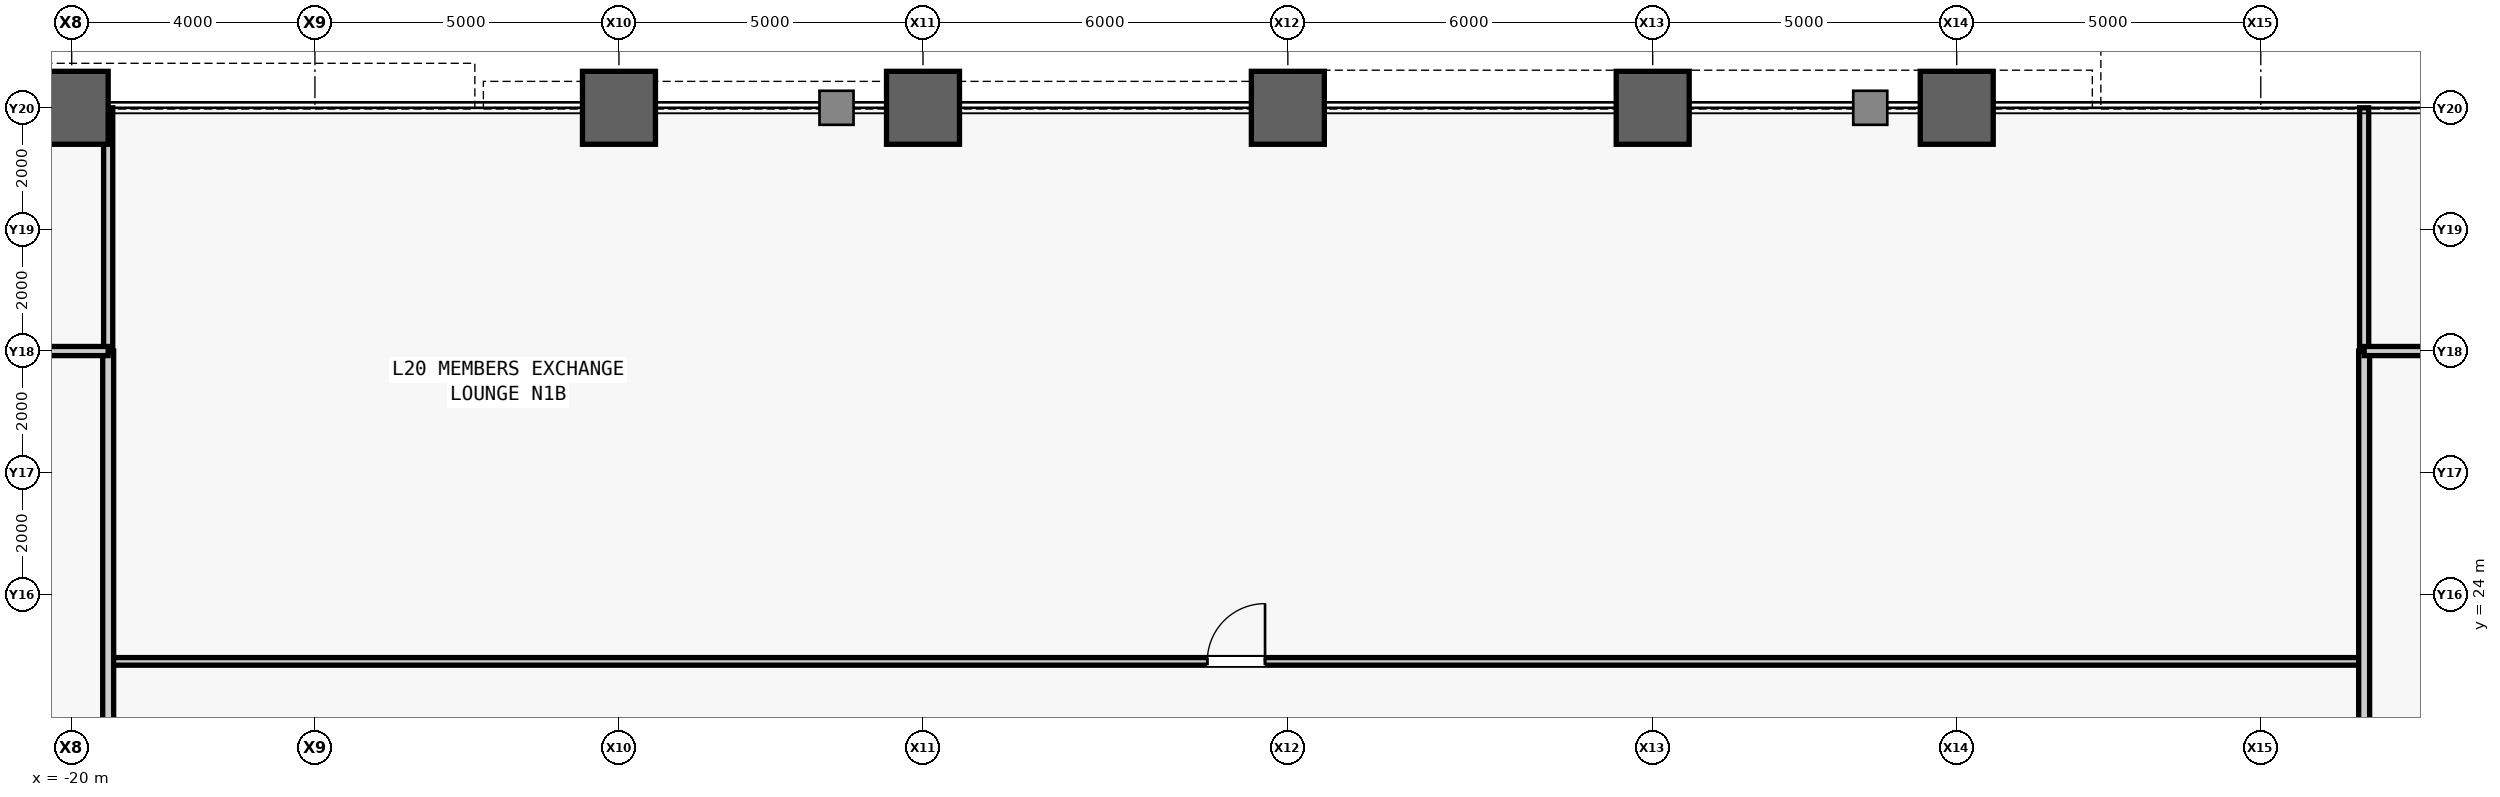
"""IFC4 building model, lengths in metres.
Left out: names, types, materials, properties, quantities, classifications, styles, units other than length and angle.
Written with IfcOpenShell. Run it as: python <this file> out.ifc"""

import sys

from ifc_helpers import new_model, si_unit, direction, frame, frame_2d, origin, origin_2d, place, context, subcontext, project, spatial, rectangle, hollow_rectangle, extrude, source, transform, mapped, element, fill, save


model = new_model("IFC4")
c1 = context("Model", 3, precision=1e-05, world=origin(), true_north=direction((0.0, 1.0)))
c2 = subcontext(c1, "Body", "Model", "MODEL_VIEW")
j1 = project(units=[si_unit("LENGTHUNIT", "METRE"), si_unit("PLANEANGLEUNIT", "RADIAN")], contexts=[c1])
p1 = place(None, origin())
s1 = spatial("IfcSite", under=j1, at=p1, CompositionType="ELEMENT")
p2 = place(p1, origin())
s2 = spatial("IfcBuilding", under=s1, at=p2, CompositionType="ELEMENT")
p3 = place(p2, frame((0.0, 0.0, 91.4)))
s3 = spatial("IfcBuildingStorey", under=s2, at=p3, CompositionType="ELEMENT", Elevation=91.4)
m1 = source(origin(), c2, "Body", "SweptSolid", [
    extrude(hollow_rectangle(XDim=1.2, YDim=1.2, WallThickness=0.07, at=origin_2d()), origin(), (0.0, 0.0, 1.0), 4.1),
])
for number, where, z_axis, x_axis in (
    (1, (-20.0, 32.0, 0.0), (0.0, 0.0, 1.0), (1.0, 0.0, 0.0)),
    (2, (-11.0, 32.0, 0.0), (0.0, 0.0, 1.0), (1.0, 0.0, 0.0)),
    (3, (-6.0, 32.0, 0.0), (0.0, 0.0, 1.0), (1.0, 0.0, 0.0)),
    (4, (0.0, 32.0, 0.0), (0.0, 0.0, 1.0), (1.0, 0.0, 0.0)),
    (5, (6.0, 32.0, 0.0), (0.0, 0.0, 1.0), (1.0, 0.0, 0.0)),
    (6, (11.0, 32.0, 0.0), (0.0, 0.0, 1.0), (1.0, 0.0, 0.0)),
):
    element("IfcColumn", number, at=place(p3, frame(where, z_axis=z_axis, x_axis=x_axis)), inside=s3, PredefinedType="COLUMN", context=c2, shape_type="MappedRepresentation", body=[
        mapped(m1, transform((0.0, 0.0, 0.0), scale=1.0)),
    ])
m2 = source(origin(), c2, "Body", "SweptSolid", [
    extrude(rectangle(XDim=37.1, YDim=0.125, at=frame_2d((18.55, 0.0))), origin(), (0.0, 0.0, 1.0), 3.84),
])
p4 = place(p3, frame((-19.4, 22.896, 0.0), z_axis=(0.0, 0.0, 1.0), x_axis=(1.0, 0.0, 0.0)))
e7 = element("IfcWall", 7, at=p4, inside=s3, PredefinedType="PARTITIONING", context=c2, shape_type="MappedRepresentation", body=[
    mapped(m2, transform((0.0, 0.0, 0.0), scale=1.0)),
])
m3 = source(origin(), c2, "Body", "SweptSolid", [
    extrude(rectangle(XDim=0.95, YDim=2.15, at=frame_2d((0.475, 1.075))), frame((0.0, 0.073, 0.0), z_axis=(0.0, -1.0, 0.0), x_axis=(1.0, 0.0, 0.0)), (0.0, 0.0, 1.0), 0.145),
])
p5 = place(p4, frame((18.075, 0.0, 0.0)))
e8 = element("IfcOpeningElement", 8, at=p5, cuts=e7, PredefinedType="OPENING", context=c2, shape_type="MappedRepresentation", body=[
    mapped(m3, transform((0.0, 0.0, 0.0), scale=1.0)),
])
m4 = source(origin(), c2, "Body", "SweptSolid", [
    extrude(rectangle(XDim=4.0, YDim=0.15, at=frame_2d((2.0, 0.0))), origin(), (0.0, 0.0, 1.0), 3.84),
])
for number, where, z_axis, x_axis in (
    (9, (-19.4, 28.0, 0.0), (0.0, 0.0, 1.0), (0.0, 1.0, 0.0)),
    (10, (17.7, 28.0, 0.0), (0.0, 0.0, 1.0), (0.0, 1.0, 0.0)),
):
    element("IfcWall", number, at=place(p3, frame(where, z_axis=z_axis, x_axis=x_axis)), inside=s3, PredefinedType="PARTITIONING", context=c2, shape_type="MappedRepresentation", body=[
        mapped(m4, transform((0.0, 0.0, 0.0), scale=1.0)),
    ])
m5 = source(origin(), c2, "Body", "SweptSolid", [
    extrude(rectangle(XDim=56.0, YDim=0.18, at=frame_2d((28.0, 0.0))), origin(), (0.0, 0.0, 1.0), 3.371),
])
p6 = place(p3, frame((-19.4, -28.0, 0.0), z_axis=(0.0, 0.0, 1.0), x_axis=(0.0, 1.0, 0.0)))
e11 = element("IfcWall", 11, at=p6, inside=s3, PredefinedType="PARTITIONING", context=c2, shape_type="MappedRepresentation", body=[
    mapped(m5, transform((0.0, 0.0, 0.0), scale=1.0)),
])
m6 = source(origin(), c2, "Body", "SweptSolid", [
    extrude(rectangle(XDim=0.95, YDim=2.15, at=frame_2d((0.475, 1.075))), frame((0.0, 0.1, 0.0), z_axis=(0.0, -1.0, 0.0), x_axis=(1.0, 0.0, 0.0)), (0.0, 0.0, 1.0), 0.2),
])
p7 = place(p6, frame((16.299, 0.0, 0.0)))
e12 = element("IfcOpeningElement", 12, at=p7, cuts=e11, PredefinedType="OPENING", context=c2, shape_type="MappedRepresentation", body=[
    mapped(m6, transform((0.0, 0.0, 0.0), scale=1.0)),
])
p8 = place(p6, frame((22.923, 0.0, 0.0)))
e13 = element("IfcOpeningElement", 13, at=p8, cuts=e11, PredefinedType="OPENING", context=c2, shape_type="MappedRepresentation", body=[
    mapped(m6, transform((0.0, 0.0, 0.0), scale=1.0)),
])
p9 = place(p6, frame((30.712, 0.0, 0.0)))
e14 = element("IfcOpeningElement", 14, at=p9, cuts=e11, PredefinedType="OPENING", context=c2, shape_type="MappedRepresentation", body=[
    mapped(m6, transform((0.0, 0.0, 0.0), scale=1.0)),
])
p10 = place(p6, frame((37.913, 0.0, 0.0)))
e15 = element("IfcOpeningElement", 15, at=p10, cuts=e11, PredefinedType="OPENING", context=c2, shape_type="MappedRepresentation", body=[
    mapped(m6, transform((0.0, 0.0, 0.0), scale=1.0)),
])
m7 = source(origin(), c2, "Body", "SweptSolid", [
    extrude(rectangle(XDim=56.0, YDim=0.18, at=frame_2d((28.0, 0.0))), origin(), (0.0, 0.0, 1.0), 3.84),
])
p11 = place(p3, frame((17.7, -28.0, 0.0), z_axis=(0.0, 0.0, 1.0), x_axis=(0.0, 1.0, 0.0)))
e16 = element("IfcWall", 16, at=p11, inside=s3, PredefinedType="PARTITIONING", context=c2, shape_type="MappedRepresentation", body=[
    mapped(m7, transform((0.0, 0.0, 0.0), scale=1.0)),
])
p12 = place(p11, frame((16.587, 0.0, 0.0)))
e17 = element("IfcOpeningElement", 17, at=p12, cuts=e16, PredefinedType="OPENING", context=c2, shape_type="MappedRepresentation", body=[
    mapped(m6, transform((0.0, 0.0, 0.0), scale=1.0)),
])
p13 = place(p11, frame((23.788, 0.0, 0.0)))
e18 = element("IfcOpeningElement", 18, at=p13, cuts=e16, PredefinedType="OPENING", context=c2, shape_type="MappedRepresentation", body=[
    mapped(m6, transform((0.0, 0.0, 0.0), scale=1.0)),
])
p14 = place(p11, frame((31.577, 0.0, 0.0)))
e19 = element("IfcOpeningElement", 19, at=p14, cuts=e16, PredefinedType="OPENING", context=c2, shape_type="MappedRepresentation", body=[
    mapped(m6, transform((0.0, 0.0, 0.0), scale=1.0)),
])
p15 = place(p11, frame((38.201, 0.0, 0.0)))
e20 = element("IfcOpeningElement", 20, at=p15, cuts=e16, PredefinedType="OPENING", context=c2, shape_type="MappedRepresentation", body=[
    mapped(m6, transform((0.0, 0.0, 0.0), scale=1.0)),
])
m8 = source(origin(), c2, "Body", "SweptSolid", [
    extrude(rectangle(XDim=8.6, YDim=0.15, at=frame_2d((4.3, 0.0))), origin(), (0.0, 0.0, 1.0), 3.84),
])
p16 = place(p3, frame((-28.0, 28.0, 0.0), z_axis=(0.0, 0.0, 1.0), x_axis=(1.0, 0.0, 0.0)))
e21 = element("IfcWall", 21, at=p16, inside=s3, PredefinedType="PARTITIONING", context=c2, shape_type="MappedRepresentation", body=[
    mapped(m8, transform((0.0, 0.0, 0.0), scale=1.0)),
])
m9 = source(origin(), c2, "Body", "SweptSolid", [
    extrude(rectangle(XDim=0.95, YDim=2.15, at=frame_2d((0.475, 1.075))), frame((0.0, 0.085, 0.0), z_axis=(0.0, -1.0, 0.0), x_axis=(1.0, 0.0, 0.0)), (0.0, 0.0, 1.0), 0.17),
])
p17 = place(p16, frame((3.825, 0.0, 0.0)))
e22 = element("IfcOpeningElement", 22, at=p17, cuts=e21, PredefinedType="OPENING", context=c2, shape_type="MappedRepresentation", body=[
    mapped(m9, transform((0.0, 0.0, 0.0), scale=1.0)),
])
m10 = source(origin(), c2, "Body", "SweptSolid", [
    extrude(rectangle(XDim=10.3, YDim=0.15, at=frame_2d((5.15, 0.0))), origin(), (0.0, 0.0, 1.0), 3.84),
])
p18 = place(p3, frame((17.7, 28.0, 0.0), z_axis=(0.0, 0.0, 1.0), x_axis=(1.0, 0.0, 0.0)))
e23 = element("IfcWall", 23, at=p18, inside=s3, PredefinedType="PARTITIONING", context=c2, shape_type="MappedRepresentation", body=[
    mapped(m10, transform((0.0, 0.0, 0.0), scale=1.0)),
])
p19 = place(p18, frame((4.675, 0.0, 0.0)))
e24 = element("IfcOpeningElement", 24, at=p19, cuts=e23, PredefinedType="OPENING", context=c2, shape_type="MappedRepresentation", body=[
    mapped(m9, transform((0.0, 0.0, 0.0), scale=1.0)),
])
m11 = source(origin(), c2, "Body", "SweptSolid", [
    extrude(rectangle(XDim=0.95, YDim=2.15, at=frame_2d((0.475, 1.075))), frame((0.0, 0.025, 0.0), z_axis=(0.0, -1.0, 0.0), x_axis=(1.0, 0.0, 0.0)), (0.0, 0.0, 1.0), 0.05),
])
p20 = place(p5, origin())
e25 = element("IfcDoor", 25, at=p20, inside=s3, OperationType="SINGLE_SWING_RIGHT", PredefinedType="DOOR", context=c2, shape_type="MappedRepresentation", body=[
    mapped(m11, transform((0.0, 0.0, 0.0), scale=1.0)),
])
fill(e8, e25)
save(model, sys.argv[1])
